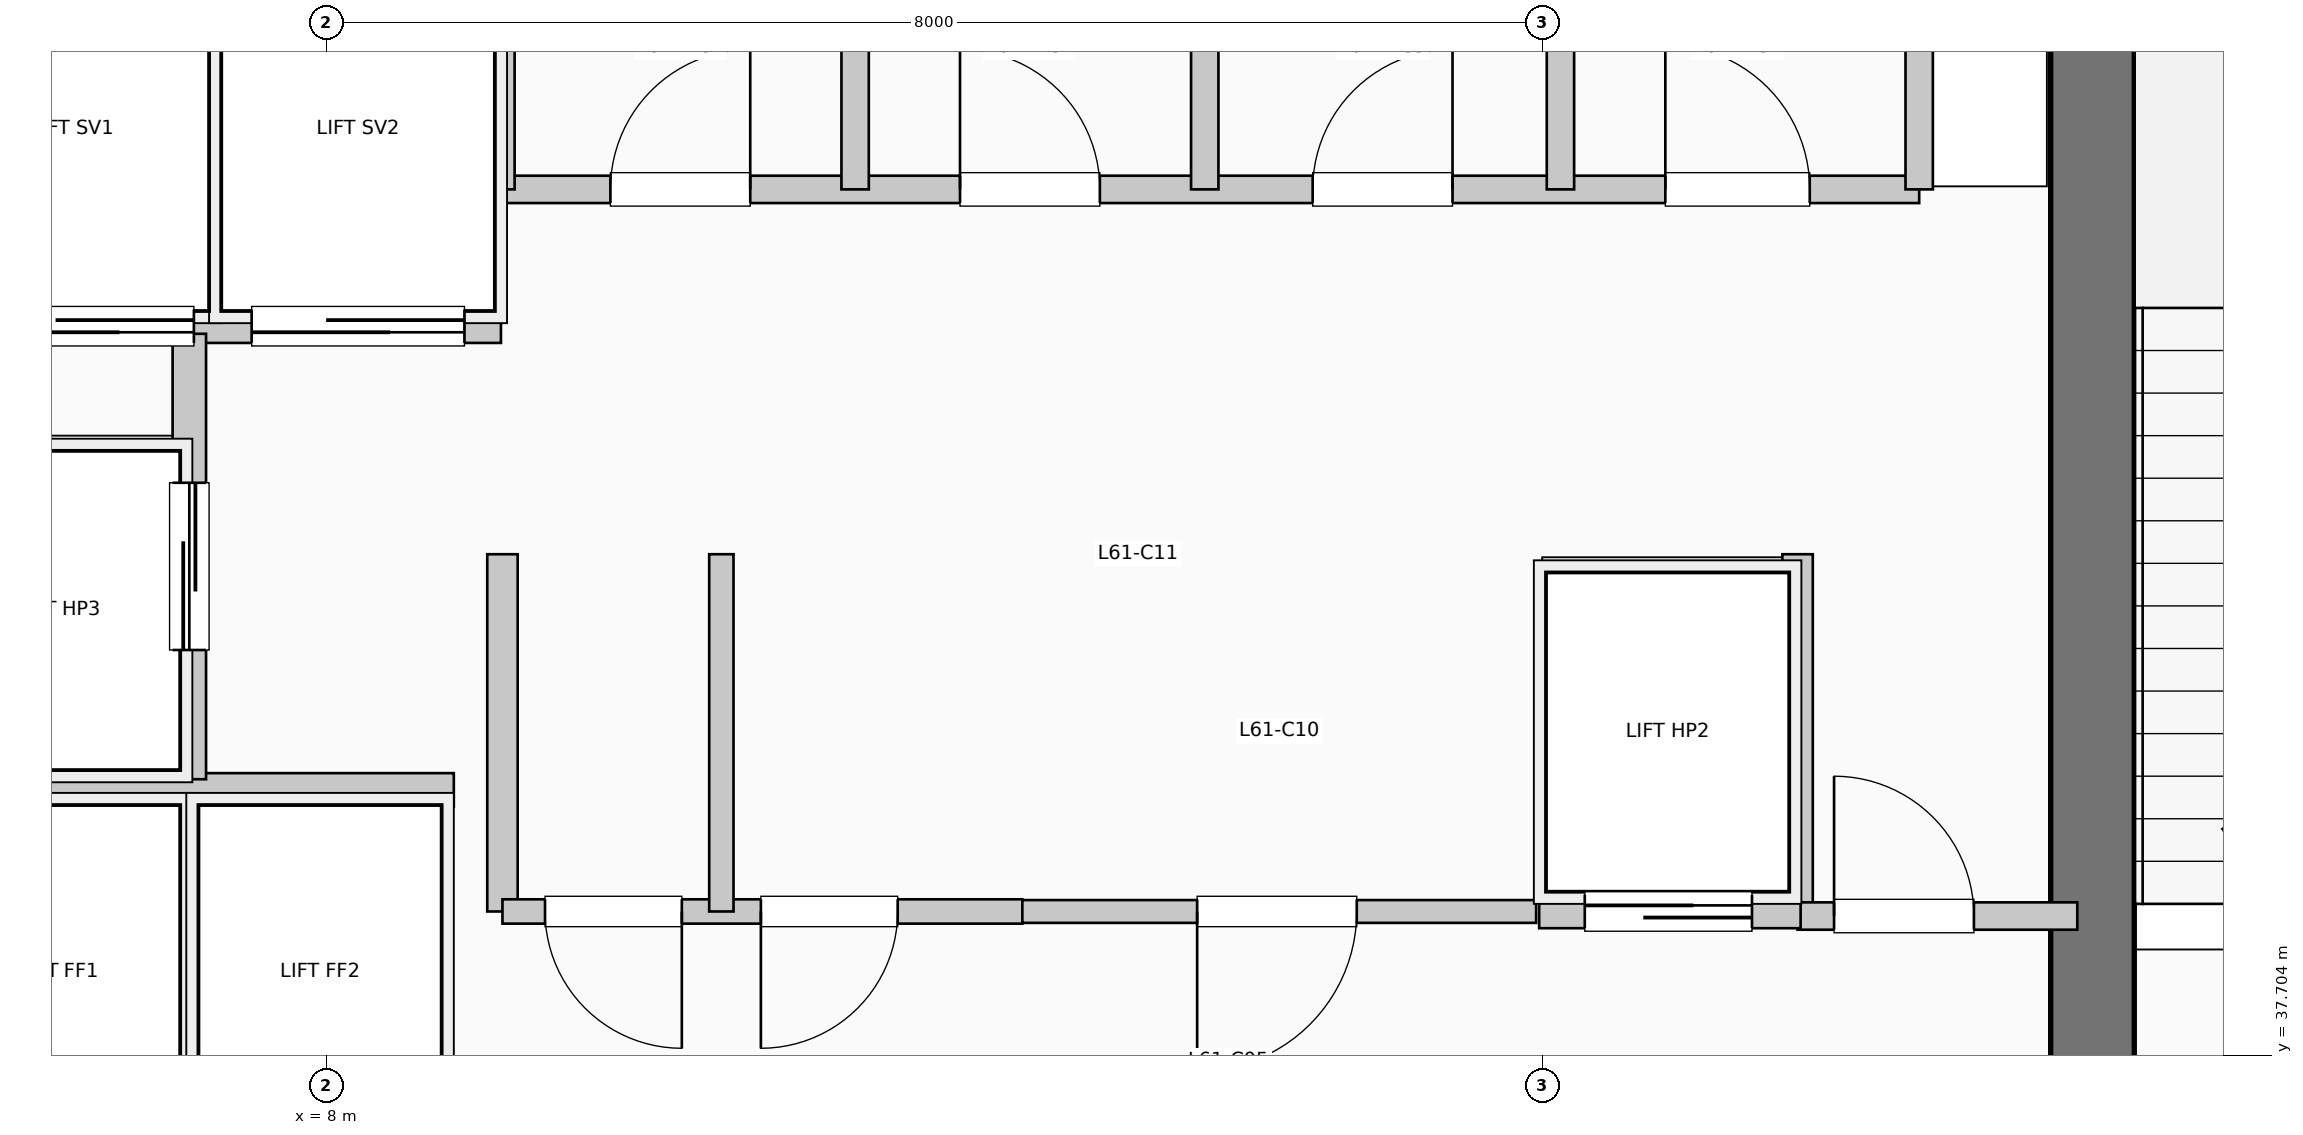
"""IFC4 building model, lengths in metres.
Left out: names, types, materials, properties, quantities, classifications, styles, units other than length and angle.
Written with IfcOpenShell. Run it as: python <this file> out.ifc"""

import sys

from ifc_helpers import new_model, si_unit, direction, frame, frame_2d, origin, place, context, subcontext, project, spatial, rectangle, extrude, element, fill, save


model = new_model("IFC4")
c1 = context("Model", 3, precision=1e-05, world=origin(), true_north=direction((0.0, 1.0)))
c2 = subcontext(c1, "Body", "Model", "MODEL_VIEW")
j1 = project(units=[si_unit("LENGTHUNIT", "METRE"), si_unit("PLANEANGLEUNIT", "RADIAN")], contexts=[c1])
p1 = place(None, origin())
s1 = spatial("IfcSite", under=j1, at=p1, CompositionType="ELEMENT")
p2 = place(p1, origin())
s2 = spatial("IfcBuilding", under=s1, at=p2, CompositionType="ELEMENT")
p3 = place(p2, frame((0.0, 0.0, 251.46)))
s3 = spatial("IfcBuildingStorey", under=s2, at=p3, CompositionType="ELEMENT", Elevation=251.46)
p4 = place(p3, frame((19.62, 37.15, 0.0), z_axis=(0.0, 0.0, 1.0), x_axis=(0.0, 1.0, 0.0)))
e1 = element("IfcWall", 1, at=p4, inside=s3, PredefinedType="SHEAR", context=c2, shape_type="SweptSolid", body=[
    extrude(rectangle(XDim=7.89, YDim=0.55, at=frame_2d((3.945, 0.0))), origin(), (0.0, 0.0, 1.0), 4.95),
])
p5 = place(p3, frame((5.38, 39.45, 0.0), z_axis=(0.0, 0.0, 1.0), x_axis=(1.0, 0.0, 0.0)))
e2 = element("IfcWall", 2, at=p5, inside=s3, PredefinedType="PARTITIONING", context=c2, shape_type="SweptSolid", body=[
    extrude(rectangle(XDim=3.46, YDim=0.22, at=frame_2d((1.73, 0.0))), origin(), (0.0, 0.0, 1.0), 4.7),
])
p6 = place(p3, frame((5.38, 42.5, 0.0), z_axis=(0.0, 0.0, 1.0), x_axis=(1.0, 0.0, 0.0)))
e3 = element("IfcWall", 3, at=p6, inside=s3, PredefinedType="PARTITIONING", context=c2, shape_type="SweptSolid", body=[
    extrude(rectangle(XDim=3.77, YDim=0.22, at=frame_2d((1.885, 0.0))), origin(), (0.0, 0.0, 1.0), 4.7),
])
p7 = place(p6, frame((1.75, 0.0, 0.0), z_axis=(0.0, 0.0, 1.0), x_axis=(-1.0, 0.0, 0.0)))
e4 = element("IfcOpeningElement", 4, at=p7, cuts=e3, PredefinedType="OPENING", context=c2, shape_type="SweptSolid", body=[
    extrude(rectangle(XDim=1.4, YDim=2.2, at=frame_2d((0.7, 1.1))), frame((0.0, 0.12, 0.0), z_axis=(0.0, -1.0, 0.0), x_axis=(1.0, 0.0, 0.0)), (0.0, 0.0, 1.0), 0.24),
])
p8 = place(p6, frame((3.53, 0.0, 0.0), z_axis=(0.0, 0.0, 1.0), x_axis=(-1.0, 0.0, 0.0)))
e5 = element("IfcOpeningElement", 5, at=p8, cuts=e3, PredefinedType="OPENING", context=c2, shape_type="SweptSolid", body=[
    extrude(rectangle(XDim=1.4, YDim=2.2, at=frame_2d((0.7, 1.1))), frame((0.0, 0.12, 0.0), z_axis=(0.0, -1.0, 0.0), x_axis=(1.0, 0.0, 0.0)), (0.0, 0.0, 1.0), 0.24),
])
p9 = place(p3, frame((7.1, 39.52, 0.0), z_axis=(0.0, 0.0, 1.0), x_axis=(0.0, 1.0, 0.0)))
e6 = element("IfcWall", 6, at=p9, inside=s3, PredefinedType="PARTITIONING", context=c2, shape_type="SweptSolid", body=[
    extrude(rectangle(XDim=2.93, YDim=0.22, at=frame_2d((1.465, 0.0))), origin(), (0.0, 0.0, 1.0), 4.7),
])
p10 = place(p9, frame((0.85, 0.0, 0.0)))
e7 = element("IfcOpeningElement", 7, at=p10, cuts=e6, PredefinedType="OPENING", context=c2, shape_type="SweptSolid", body=[
    extrude(rectangle(XDim=1.1, YDim=2.2, at=frame_2d((0.55, 1.1))), frame((0.0, 0.12, 0.0), z_axis=(0.0, -1.0, 0.0), x_axis=(1.0, 0.0, 0.0)), (0.0, 0.0, 1.0), 0.24),
])
for number, where, z_axis, x_axis in (
    (8, (9.16, 38.65, 0.0), (0.0, 0.0, 1.0), (0.0, 1.0, 0.0)),
    (9, (17.68, 38.65, 0.0), (0.0, 0.0, 1.0), (0.0, 1.0, 0.0)),
):
    element("IfcWall", number, at=place(p3, frame(where, z_axis=z_axis, x_axis=x_axis)), inside=s3, PredefinedType="PARTITIONING", context=c2, shape_type="SweptSolid", body=[
        extrude(rectangle(XDim=2.35, YDim=0.2, at=frame_2d((1.175, 0.0))), origin(), (0.0, 0.0, 1.0), 4.7),
    ])
p11 = place(p3, frame((17.68, 38.62, 0.0), z_axis=(0.0, 0.0, 1.0), x_axis=(1.0, 0.0, 0.0)))
e10 = element("IfcWall", 10, at=p11, inside=s3, PredefinedType="PARTITIONING", context=c2, shape_type="SweptSolid", body=[
    extrude(rectangle(XDim=1.84, YDim=0.18, at=frame_2d((0.92, 0.0))), origin(), (0.0, 0.0, 1.0), 4.7),
])
p12 = place(p11, frame((0.24, 0.0, 0.0)))
e11 = element("IfcOpeningElement", 11, at=p12, cuts=e10, PredefinedType="OPENING", context=c2, shape_type="SweptSolid", body=[
    extrude(rectangle(XDim=0.92, YDim=2.1, at=frame_2d((0.46, 1.05))), frame((0.0, 0.1, 0.0), z_axis=(0.0, -1.0, 0.0), x_axis=(1.0, 0.0, 0.0)), (0.0, 0.0, 1.0), 0.2),
])
p13 = place(p3, frame((9.16, 38.65, 0.0), z_axis=(0.0, 0.0, 1.0), x_axis=(1.0, 0.0, 0.0)))
e12 = element("IfcWall", 12, at=p13, inside=s3, PredefinedType="PARTITIONING", context=c2, shape_type="SweptSolid", body=[
    extrude(rectangle(XDim=3.42, YDim=0.16, at=frame_2d((1.71, 0.0))), origin(), (0.0, 0.0, 1.0), 4.7),
])
p14 = place(p13, frame((1.18, 0.0, 0.0), z_axis=(0.0, 0.0, 1.0), x_axis=(-1.0, 0.0, 0.0)))
e13 = element("IfcOpeningElement", 13, at=p14, cuts=e12, PredefinedType="OPENING", context=c2, shape_type="SweptSolid", body=[
    extrude(rectangle(XDim=0.9, YDim=2.15, at=frame_2d((0.45, 1.075))), frame((0.0, 0.09, 0.0), z_axis=(0.0, -1.0, 0.0), x_axis=(1.0, 0.0, 0.0)), (0.0, 0.0, 1.0), 0.18),
])
p15 = place(p13, frame((2.6, 0.0, 0.0), z_axis=(0.0, 0.0, 1.0), x_axis=(-1.0, 0.0, 0.0)))
e14 = element("IfcOpeningElement", 14, at=p15, cuts=e12, PredefinedType="OPENING", context=c2, shape_type="SweptSolid", body=[
    extrude(rectangle(XDim=0.9, YDim=2.15, at=frame_2d((0.45, 1.075))), frame((0.0, 0.09, 0.0), z_axis=(0.0, -1.0, 0.0), x_axis=(1.0, 0.0, 0.0)), (0.0, 0.0, 1.0), 0.18),
])
p16 = place(p3, frame((10.6, 38.65, 0.0), z_axis=(0.0, 0.0, 1.0), x_axis=(0.0, 1.0, 0.0)))
e15 = element("IfcWall", 15, at=p16, inside=s3, PredefinedType="PARTITIONING", context=c2, shape_type="SweptSolid", body=[
    extrude(rectangle(XDim=2.35, YDim=0.16, at=frame_2d((1.175, 0.0))), origin(), (0.0, 0.0, 1.0), 4.7),
])
p17 = place(p3, frame((12.58, 38.65, 0.0), z_axis=(0.0, 0.0, 1.0), x_axis=(1.0, 0.0, 0.0)))
e16 = element("IfcWall", 16, at=p17, inside=s3, PredefinedType="PARTITIONING", context=c2, shape_type="SweptSolid", body=[
    extrude(rectangle(XDim=3.38, YDim=0.15, at=frame_2d((1.69, 0.0))), origin(), (0.0, 0.0, 1.0), 4.7),
])
p18 = place(p17, frame((2.2, 0.0, 0.0), z_axis=(0.0, 0.0, 1.0), x_axis=(-1.0, 0.0, 0.0)))
e17 = element("IfcOpeningElement", 17, at=p18, cuts=e16, PredefinedType="OPENING", context=c2, shape_type="SweptSolid", body=[
    extrude(rectangle(XDim=1.05, YDim=2.15, at=frame_2d((0.525, 1.075))), frame((0.0, 0.085, 0.0), z_axis=(0.0, -1.0, 0.0), x_axis=(1.0, 0.0, 0.0)), (0.0, 0.0, 1.0), 0.17),
])
p19 = place(p3, frame((15.98, 38.65, 0.0), z_axis=(0.0, 0.0, 1.0), x_axis=(1.0, 0.0, 0.0)))
e18 = element("IfcWall", 18, at=p19, inside=s3, PredefinedType="PARTITIONING", context=c2, shape_type="SweptSolid", body=[
    extrude(rectangle(XDim=1.72, YDim=0.22, at=frame_2d((0.86, 0.0))), origin(), (0.0, 0.0, 1.0), 4.7),
])
p20 = place(p19, frame((0.3, 0.0, 0.0)))
e19 = element("IfcOpeningElement", 19, at=p20, cuts=e18, PredefinedType="OPENING", context=c2, shape_type="SweptSolid", body=[
    extrude(rectangle(XDim=1.1, YDim=2.2, at=frame_2d((0.55, 1.1))), frame((0.0, 0.12, 0.0), z_axis=(0.0, -1.0, 0.0), x_axis=(1.0, 0.0, 0.0)), (0.0, 0.0, 1.0), 0.24),
])
p21 = place(p3, frame((9.15, 43.4, 0.0), z_axis=(0.0, 0.0, 1.0), x_axis=(1.0, 0.0, 0.0)))
e20 = element("IfcWall", 20, at=p21, inside=s3, PredefinedType="PLUMBINGWALL", context=c2, shape_type="SweptSolid", body=[
    extrude(rectangle(XDim=9.33, YDim=0.18, at=frame_2d((4.665, 0.0))), origin(), (0.0, 0.0, 1.0), 4.7),
])
p22 = place(p21, frame((0.72, 0.0, 0.0)))
e21 = element("IfcOpeningElement", 21, at=p22, cuts=e20, PredefinedType="OPENING", context=c2, shape_type="SweptSolid", body=[
    extrude(rectangle(XDim=0.92, YDim=2.1, at=frame_2d((0.46, 1.05))), frame((0.0, 0.1, 0.0), z_axis=(0.0, -1.0, 0.0), x_axis=(1.0, 0.0, 0.0)), (0.0, 0.0, 1.0), 0.2),
])
p23 = place(p21, frame((3.02, 0.0, 0.0)))
e22 = element("IfcOpeningElement", 22, at=p23, cuts=e20, PredefinedType="OPENING", context=c2, shape_type="SweptSolid", body=[
    extrude(rectangle(XDim=0.92, YDim=2.1, at=frame_2d((0.46, 1.05))), frame((0.0, 0.1, 0.0), z_axis=(0.0, -1.0, 0.0), x_axis=(1.0, 0.0, 0.0)), (0.0, 0.0, 1.0), 0.2),
])
p24 = place(p21, frame((5.34, 0.0, 0.0)))
e23 = element("IfcOpeningElement", 23, at=p24, cuts=e20, PredefinedType="OPENING", context=c2, shape_type="SweptSolid", body=[
    extrude(rectangle(XDim=0.92, YDim=2.1, at=frame_2d((0.46, 1.05))), frame((0.0, 0.1, 0.0), z_axis=(0.0, -1.0, 0.0), x_axis=(1.0, 0.0, 0.0)), (0.0, 0.0, 1.0), 0.2),
])
p25 = place(p21, frame((7.66, 0.0, 0.0)))
e24 = element("IfcOpeningElement", 24, at=p25, cuts=e20, PredefinedType="OPENING", context=c2, shape_type="SweptSolid", body=[
    extrude(rectangle(XDim=0.95, YDim=2.1, at=frame_2d((0.475, 1.05))), frame((0.0, 0.1, 0.0), z_axis=(0.0, -1.0, 0.0), x_axis=(1.0, 0.0, 0.0)), (0.0, 0.0, 1.0), 0.2),
])
for number, where, z_axis, x_axis in (
    (25, (9.15, 43.4, 0.0), (0.0, 0.0, 1.0), (0.0, 1.0, 0.0)),
    (26, (18.48, 43.4, 0.0), (0.0, 0.0, 1.0), (0.0, 1.0, 0.0)),
    (27, (11.48, 43.4, 0.0), (0.0, 0.0, 1.0), (0.0, 1.0, 0.0)),
    (28, (13.78, 43.4, 0.0), (0.0, 0.0, 1.0), (0.0, 1.0, 0.0)),
    (29, (16.12, 43.4, 0.0), (0.0, 0.0, 1.0), (0.0, 1.0, 0.0)),
):
    element("IfcWall", number, at=place(p3, frame(where, z_axis=z_axis, x_axis=x_axis)), inside=s3, PredefinedType="PLUMBINGWALL", context=c2, shape_type="SweptSolid", body=[
        extrude(rectangle(XDim=1.88, YDim=0.18, at=frame_2d((0.94, 0.0))), origin(), (0.0, 0.0, 1.0), 4.7),
    ])
p26 = place(p7, origin())
e30 = element("IfcDoor", 30, at=p26, inside=s3, OperationType="SLIDING_TO_LEFT", PredefinedType="DOOR", context=c2, shape_type="SweptSolid", body=[
    extrude(rectangle(XDim=1.4, YDim=2.2, at=frame_2d((0.7, 1.1))), frame((0.0, 0.025, 0.0), z_axis=(0.0, -1.0, 0.0), x_axis=(1.0, 0.0, 0.0)), (0.0, 0.0, 1.0), 0.05),
])
fill(e4, e30)
p27 = place(p8, origin())
e31 = element("IfcDoor", 31, at=p27, inside=s3, OperationType="SLIDING_TO_LEFT", PredefinedType="DOOR", context=c2, shape_type="SweptSolid", body=[
    extrude(rectangle(XDim=1.4, YDim=2.2, at=frame_2d((0.7, 1.1))), frame((0.0, 0.025, 0.0), z_axis=(0.0, -1.0, 0.0), x_axis=(1.0, 0.0, 0.0)), (0.0, 0.0, 1.0), 0.05),
])
fill(e5, e31)
p28 = place(p10, origin())
e32 = element("IfcDoor", 32, at=p28, inside=s3, OperationType="SLIDING_TO_LEFT", PredefinedType="DOOR", context=c2, shape_type="SweptSolid", body=[
    extrude(rectangle(XDim=1.1, YDim=2.2, at=frame_2d((0.55, 1.1))), frame((0.0, 0.025, 0.0), z_axis=(0.0, -1.0, 0.0), x_axis=(1.0, 0.0, 0.0)), (0.0, 0.0, 1.0), 0.05),
])
fill(e7, e32)
p29 = place(p12, origin())
e33 = element("IfcDoor", 33, at=p29, inside=s3, OperationType="SINGLE_SWING_LEFT", PredefinedType="DOOR", context=c2, shape_type="SweptSolid", body=[
    extrude(rectangle(XDim=0.92, YDim=2.1, at=frame_2d((0.46, 1.05))), frame((0.0, 0.025, 0.0), z_axis=(0.0, -1.0, 0.0), x_axis=(1.0, 0.0, 0.0)), (0.0, 0.0, 1.0), 0.05),
])
fill(e11, e33)
p30 = place(p14, origin())
e34 = element("IfcDoor", 34, at=p30, inside=s3, OperationType="SINGLE_SWING_RIGHT", PredefinedType="DOOR", context=c2, shape_type="SweptSolid", body=[
    extrude(rectangle(XDim=0.9, YDim=2.15, at=frame_2d((0.45, 1.075))), frame((0.0, 0.025, 0.0), z_axis=(0.0, -1.0, 0.0), x_axis=(1.0, 0.0, 0.0)), (0.0, 0.0, 1.0), 0.05),
])
fill(e13, e34)
p31 = place(p15, origin())
e35 = element("IfcDoor", 35, at=p31, inside=s3, OperationType="SINGLE_SWING_LEFT", PredefinedType="DOOR", context=c2, shape_type="SweptSolid", body=[
    extrude(rectangle(XDim=0.9, YDim=2.15, at=frame_2d((0.45, 1.075))), frame((0.0, 0.025, 0.0), z_axis=(0.0, -1.0, 0.0), x_axis=(1.0, 0.0, 0.0)), (0.0, 0.0, 1.0), 0.05),
])
fill(e14, e35)
p32 = place(p18, origin())
e36 = element("IfcDoor", 36, at=p32, inside=s3, OperationType="SINGLE_SWING_LEFT", PredefinedType="DOOR", context=c2, shape_type="SweptSolid", body=[
    extrude(rectangle(XDim=1.05, YDim=2.15, at=frame_2d((0.525, 1.075))), frame((0.0, 0.025, 0.0), z_axis=(0.0, -1.0, 0.0), x_axis=(1.0, 0.0, 0.0)), (0.0, 0.0, 1.0), 0.05),
])
fill(e17, e36)
p33 = place(p20, origin())
e37 = element("IfcDoor", 37, at=p33, inside=s3, OperationType="SLIDING_TO_LEFT", PredefinedType="DOOR", context=c2, shape_type="SweptSolid", body=[
    extrude(rectangle(XDim=1.1, YDim=2.2, at=frame_2d((0.55, 1.1))), frame((0.0, 0.025, 0.0), z_axis=(0.0, -1.0, 0.0), x_axis=(1.0, 0.0, 0.0)), (0.0, 0.0, 1.0), 0.05),
])
fill(e19, e37)
p34 = place(p22, origin())
e38 = element("IfcDoor", 38, at=p34, inside=s3, OperationType="SINGLE_SWING_RIGHT", PredefinedType="DOOR", context=c2, shape_type="SweptSolid", body=[
    extrude(rectangle(XDim=0.92, YDim=2.1, at=frame_2d((0.46, 1.05))), frame((0.0, 0.025, 0.0), z_axis=(0.0, -1.0, 0.0), x_axis=(1.0, 0.0, 0.0)), (0.0, 0.0, 1.0), 0.05),
])
fill(e21, e38)
p35 = place(p23, origin())
e39 = element("IfcDoor", 39, at=p35, inside=s3, OperationType="SINGLE_SWING_LEFT", PredefinedType="DOOR", context=c2, shape_type="SweptSolid", body=[
    extrude(rectangle(XDim=0.92, YDim=2.1, at=frame_2d((0.46, 1.05))), frame((0.0, 0.025, 0.0), z_axis=(0.0, -1.0, 0.0), x_axis=(1.0, 0.0, 0.0)), (0.0, 0.0, 1.0), 0.05),
])
fill(e22, e39)
p36 = place(p24, origin())
e40 = element("IfcDoor", 40, at=p36, inside=s3, OperationType="SINGLE_SWING_RIGHT", PredefinedType="DOOR", context=c2, shape_type="SweptSolid", body=[
    extrude(rectangle(XDim=0.92, YDim=2.1, at=frame_2d((0.46, 1.05))), frame((0.0, 0.025, 0.0), z_axis=(0.0, -1.0, 0.0), x_axis=(1.0, 0.0, 0.0)), (0.0, 0.0, 1.0), 0.05),
])
fill(e23, e40)
p37 = place(p25, origin())
e41 = element("IfcDoor", 41, at=p37, inside=s3, OperationType="SINGLE_SWING_LEFT", PredefinedType="DOOR", context=c2, shape_type="SweptSolid", body=[
    extrude(rectangle(XDim=0.95, YDim=2.1, at=frame_2d((0.475, 1.05))), frame((0.0, 0.025, 0.0), z_axis=(0.0, -1.0, 0.0), x_axis=(1.0, 0.0, 0.0)), (0.0, 0.0, 1.0), 0.05),
])
fill(e24, e41)
save(model, sys.argv[1])
